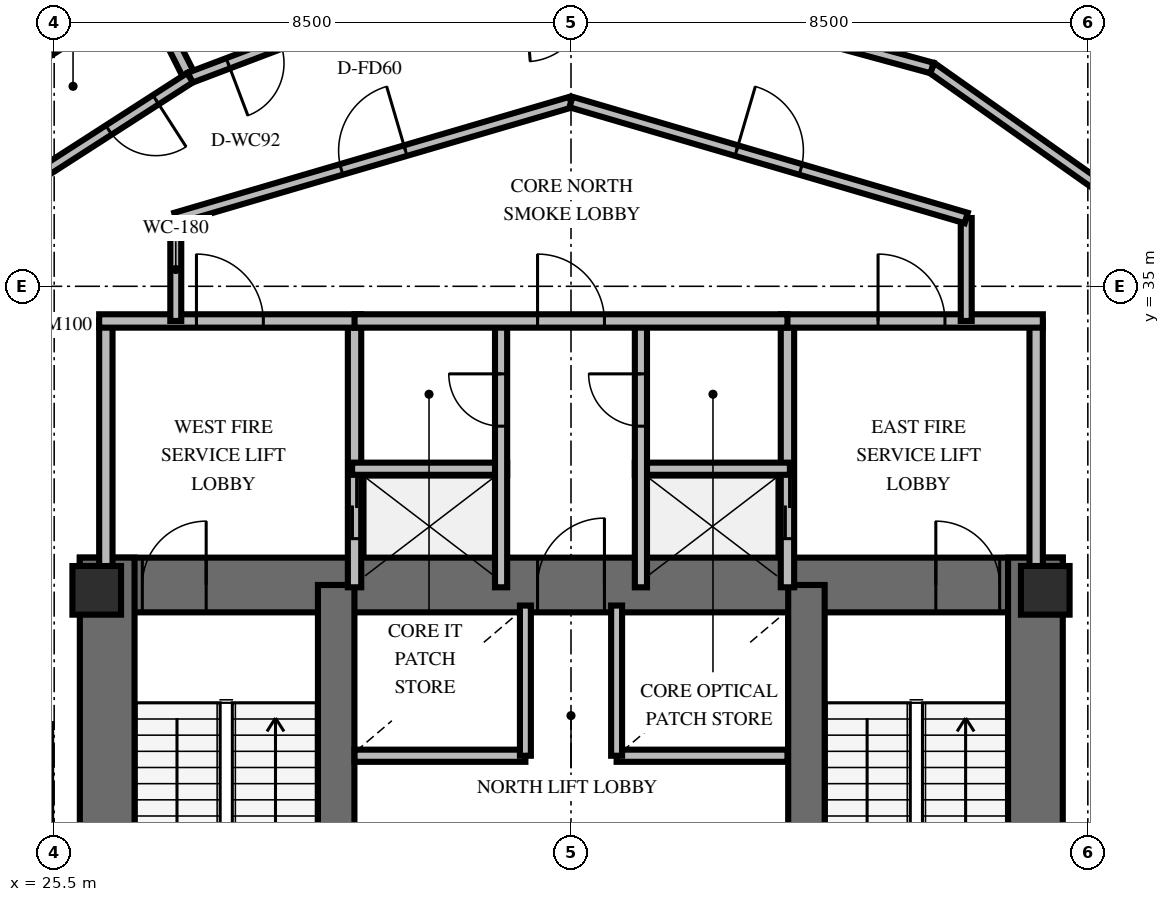
"""IFC4 building model, lengths in metres.
Left out: names, types, materials, properties, quantities, classifications, styles, units other than length and angle.
Written with IfcOpenShell. Run it as: python <this file> out.ifc"""

import sys

from ifc_helpers import new_model, si_unit, direction, frame, frame_2d, origin, origin_2d, place, context, subcontext, project, spatial, rectangle, extrude, element, fill, save


model = new_model("IFC4")
c1 = context("Model", 3, precision=1e-05, world=origin(), true_north=direction((0.0, 1.0)))
c2 = subcontext(c1, "Body", "Model", "MODEL_VIEW")
j1 = project(units=[si_unit("LENGTHUNIT", "METRE"), si_unit("PLANEANGLEUNIT", "RADIAN")], contexts=[c1])
p1 = place(None, origin())
s1 = spatial("IfcSite", under=j1, at=p1, CompositionType="ELEMENT")
p2 = place(p1, origin())
s2 = spatial("IfcBuilding", under=s1, at=p2, CompositionType="ELEMENT")
p3 = place(p2, frame((0.0, 0.0, 51.0)))
s3 = spatial("IfcBuildingStorey", under=s2, at=p3, CompositionType="ELEMENT", Elevation=51.0)
p4 = place(p3, frame((25.922, 30.088, 0.0), z_axis=(0.0, 0.0, 1.0), x_axis=(1.0, 0.0, 0.0)))
e1 = element("IfcWall", 1, at=p4, inside=s3, PredefinedType="SHEAR", context=c2, shape_type="SweptSolid", body=[
    extrude(rectangle(XDim=16.166, YDim=0.9, at=frame_2d((8.083, 0.0))), origin(), (0.0, 0.0, 1.0), 4.2),
])
p5 = place(p4, frame((1.028, 0.0, 0.0)))
e2 = element("IfcOpeningElement", 2, at=p5, cuts=e1, PredefinedType="OPENING", context=c2, shape_type="SweptSolid", body=[
    extrude(rectangle(XDim=1.05, YDim=2.15, at=frame_2d((0.525, 1.075))), frame((0.0, 0.46, 0.0), z_axis=(0.0, -1.0, 0.0), x_axis=(1.0, 0.0, 0.0)), (0.0, 0.0, 1.0), 0.92),
])
p6 = place(p4, frame((14.078, 0.0, 0.0)))
e3 = element("IfcOpeningElement", 3, at=p6, cuts=e1, PredefinedType="OPENING", context=c2, shape_type="SweptSolid", body=[
    extrude(rectangle(XDim=1.05, YDim=2.15, at=frame_2d((0.525, 1.075))), frame((0.0, 0.46, 0.0), z_axis=(0.0, -1.0, 0.0), x_axis=(1.0, 0.0, 0.0)), (0.0, 0.0, 1.0), 0.92),
])
p7 = place(p4, frame((7.528, 0.0, 0.0)))
e4 = element("IfcOpeningElement", 4, at=p7, cuts=e1, PredefinedType="OPENING", context=c2, shape_type="SweptSolid", body=[
    extrude(rectangle(XDim=1.1, YDim=2.15, at=frame_2d((0.55, 1.075))), frame((0.0, 0.46, 0.0), z_axis=(0.0, -1.0, 0.0), x_axis=(1.0, 0.0, 0.0)), (0.0, 0.0, 1.0), 0.92),
])
for number, where, z_axis, x_axis in (
    (5, (26.372, 19.662, 0.0), (0.0, 0.0, 1.0), (0.0, 1.0, 0.0)),
    (6, (41.638, 19.662, 0.0), (0.0, 0.0, 1.0), (0.0, 1.0, 0.0)),
):
    element("IfcWall", number, at=place(p3, frame(where, z_axis=z_axis, x_axis=x_axis)), inside=s3, PredefinedType="SHEAR", context=c2, shape_type="SweptSolid", body=[
        extrude(rectangle(XDim=10.876, YDim=0.9, at=frame_2d((5.438, 0.0))), origin(), (0.0, 0.0, 1.0), 4.2),
    ])
for number, where, z_axis, x_axis in (
    (7, (30.138, 20.112, 0.0), (0.0, 0.0, 1.0), (0.0, 1.0, 0.0)),
    (8, (37.872, 20.112, 0.0), (0.0, 0.0, 1.0), (0.0, 1.0, 0.0)),
):
    element("IfcWall", number, at=place(p3, frame(where, z_axis=z_axis, x_axis=x_axis)), inside=s3, PredefinedType="SHEAR", context=c2, shape_type="SweptSolid", body=[
        extrude(rectangle(XDim=9.976, YDim=0.6, at=frame_2d((4.988, 0.0))), origin(), (0.0, 0.0, 1.0), 4.2),
    ])
for number, where, z_axis, x_axis in (
    (9, (26.2, 30.0, 0.0), (0.0, 0.0, 1.0), (1.0, 0.0, 0.0)),
    (10, (41.8, 30.0, 0.0), (0.0, 0.0, 1.0), (1.0, 0.0, 0.0)),
):
    element("IfcColumn", number, at=place(p3, frame(where, z_axis=z_axis, x_axis=x_axis)), inside=s3, PredefinedType="PILASTER", context=c2, shape_type="SweptSolid", body=[
        extrude(rectangle(XDim=0.8, YDim=0.8, at=origin_2d()), origin(), (0.0, 0.0, 1.0), 4.2),
    ])
p8 = place(p3, frame((26.35, 30.05, 0.0), z_axis=(0.0, 0.0, 1.0), x_axis=(0.0, 1.0, 0.0)))
e11 = element("IfcWall", 11, at=p8, inside=s3, PredefinedType="SOLIDWALL", context=c2, shape_type="SweptSolid", body=[
    extrude(rectangle(XDim=4.38, YDim=0.22, at=frame_2d((2.19, 0.0))), origin(), (0.0, 0.0, 1.0), 3.0),
])
p9 = place(p3, frame((30.44, 30.05, 0.0), z_axis=(0.0, 0.0, 1.0), x_axis=(0.0, 1.0, 0.0)))
e12 = element("IfcWall", 12, at=p9, inside=s3, PredefinedType="SOLIDWALL", context=c2, shape_type="SweptSolid", body=[
    extrude(rectangle(XDim=4.38, YDim=0.22, at=frame_2d((2.19, 0.0))), origin(), (0.0, 0.0, 1.0), 3.0),
])
p10 = place(p9, frame((0.8, 0.0, 0.0)))
e13 = element("IfcOpeningElement", 13, at=p10, cuts=e12, PredefinedType="OPENING", context=c2, shape_type="SweptSolid", body=[
    extrude(rectangle(XDim=1.05, YDim=2.1, at=frame_2d((0.525, 1.05))), frame((0.0, 0.12, 0.0), z_axis=(0.0, -1.0, 0.0), x_axis=(1.0, 0.0, 0.0)), (0.0, 0.0, 1.0), 0.24),
])
p11 = place(p3, frame((26.24, 34.43, 0.0), z_axis=(0.0, 0.0, 1.0), x_axis=(1.0, 0.0, 0.0)))
e14 = element("IfcWall", 14, at=p11, inside=s3, PredefinedType="SOLIDWALL", context=c2, shape_type="SweptSolid", body=[
    extrude(rectangle(XDim=4.31, YDim=0.22, at=frame_2d((2.155, 0.0))), origin(), (0.0, 0.0, 1.0), 3.0),
])
p12 = place(p11, frame((1.6, 0.0, 0.0)))
e15 = element("IfcOpeningElement", 15, at=p12, cuts=e14, PredefinedType="OPENING", context=c2, shape_type="SweptSolid", body=[
    extrude(rectangle(XDim=1.1, YDim=2.15, at=frame_2d((0.55, 1.075))), frame((0.0, 0.12, 0.0), z_axis=(0.0, -1.0, 0.0), x_axis=(1.0, 0.0, 0.0)), (0.0, 0.0, 1.0), 0.24),
])
p13 = place(p3, frame((30.4, 32.0, 0.0), z_axis=(0.0, 0.0, 1.0), x_axis=(1.0, 0.0, 0.0)))
e16 = element("IfcWall", 16, at=p13, inside=s3, PredefinedType="SOLIDWALL", context=c2, shape_type="SweptSolid", body=[
    extrude(rectangle(XDim=2.55, YDim=0.2, at=frame_2d((1.275, 0.0))), origin(), (0.0, 0.0, 1.0), 3.0),
])
p14 = place(p3, frame((32.85, 30.05, 0.0), z_axis=(0.0, 0.0, 1.0), x_axis=(0.0, 1.0, 0.0)))
e17 = element("IfcWall", 17, at=p14, inside=s3, PredefinedType="SOLIDWALL", context=c2, shape_type="SweptSolid", body=[
    extrude(rectangle(XDim=4.38, YDim=0.2, at=frame_2d((2.19, 0.0))), origin(), (0.0, 0.0, 1.0), 3.0),
])
p15 = place(p14, frame((2.65, 0.0, 0.0)))
e18 = element("IfcOpeningElement", 18, at=p15, cuts=e17, PredefinedType="OPENING", context=c2, shape_type="SweptSolid", body=[
    extrude(rectangle(XDim=0.86, YDim=2.05, at=frame_2d((0.43, 1.025))), frame((0.0, 0.11, 0.0), z_axis=(0.0, -1.0, 0.0), x_axis=(1.0, 0.0, 0.0)), (0.0, 0.0, 1.0), 0.22),
])
p16 = place(p3, frame((37.56, 30.05, 0.0), z_axis=(0.0, 0.0, 1.0), x_axis=(0.0, 1.0, 0.0)))
e19 = element("IfcWall", 19, at=p16, inside=s3, PredefinedType="SOLIDWALL", context=c2, shape_type="SweptSolid", body=[
    extrude(rectangle(XDim=4.38, YDim=0.22, at=frame_2d((2.19, 0.0))), origin(), (0.0, 0.0, 1.0), 3.0),
])
p17 = place(p16, frame((0.8, 0.0, 0.0)))
e20 = element("IfcOpeningElement", 20, at=p17, cuts=e19, PredefinedType="OPENING", context=c2, shape_type="SweptSolid", body=[
    extrude(rectangle(XDim=1.05, YDim=2.1, at=frame_2d((0.525, 1.05))), frame((0.0, 0.12, 0.0), z_axis=(0.0, -1.0, 0.0), x_axis=(1.0, 0.0, 0.0)), (0.0, 0.0, 1.0), 0.24),
])
p18 = place(p3, frame((41.65, 30.05, 0.0), z_axis=(0.0, 0.0, 1.0), x_axis=(0.0, 1.0, 0.0)))
e21 = element("IfcWall", 21, at=p18, inside=s3, PredefinedType="SOLIDWALL", context=c2, shape_type="SweptSolid", body=[
    extrude(rectangle(XDim=4.38, YDim=0.22, at=frame_2d((2.19, 0.0))), origin(), (0.0, 0.0, 1.0), 3.0),
])
p19 = place(p3, frame((37.45, 34.43, 0.0), z_axis=(0.0, 0.0, 1.0), x_axis=(1.0, 0.0, 0.0)))
e22 = element("IfcWall", 22, at=p19, inside=s3, PredefinedType="SOLIDWALL", context=c2, shape_type="SweptSolid", body=[
    extrude(rectangle(XDim=4.31, YDim=0.22, at=frame_2d((2.155, 0.0))), origin(), (0.0, 0.0, 1.0), 3.0),
])
p20 = place(p19, frame((1.6, 0.0, 0.0)))
e23 = element("IfcOpeningElement", 23, at=p20, cuts=e22, PredefinedType="OPENING", context=c2, shape_type="SweptSolid", body=[
    extrude(rectangle(XDim=1.1, YDim=2.15, at=frame_2d((0.55, 1.075))), frame((0.0, 0.12, 0.0), z_axis=(0.0, -1.0, 0.0), x_axis=(1.0, 0.0, 0.0)), (0.0, 0.0, 1.0), 0.24),
])
p21 = place(p3, frame((35.05, 32.0, 0.0), z_axis=(0.0, 0.0, 1.0), x_axis=(1.0, 0.0, 0.0)))
e24 = element("IfcWall", 24, at=p21, inside=s3, PredefinedType="SOLIDWALL", context=c2, shape_type="SweptSolid", body=[
    extrude(rectangle(XDim=2.55, YDim=0.2, at=frame_2d((1.275, 0.0))), origin(), (0.0, 0.0, 1.0), 3.0),
])
p22 = place(p3, frame((35.15, 30.05, 0.0), z_axis=(0.0, 0.0, 1.0), x_axis=(0.0, 1.0, 0.0)))
e25 = element("IfcWall", 25, at=p22, inside=s3, PredefinedType="SOLIDWALL", context=c2, shape_type="SweptSolid", body=[
    extrude(rectangle(XDim=4.38, YDim=0.2, at=frame_2d((2.19, 0.0))), origin(), (0.0, 0.0, 1.0), 3.0),
])
p23 = place(p22, frame((2.65, 0.0, 0.0)))
e26 = element("IfcOpeningElement", 26, at=p23, cuts=e25, PredefinedType="OPENING", context=c2, shape_type="SweptSolid", body=[
    extrude(rectangle(XDim=0.86, YDim=2.05, at=frame_2d((0.43, 1.025))), frame((0.0, 0.11, 0.0), z_axis=(0.0, -1.0, 0.0), x_axis=(1.0, 0.0, 0.0)), (0.0, 0.0, 1.0), 0.22),
])
p24 = place(p3, frame((30.44, 34.43, 0.0), z_axis=(0.0, 0.0, 1.0), x_axis=(1.0, 0.0, 0.0)))
e27 = element("IfcWall", 27, at=p24, inside=s3, PredefinedType="SOLIDWALL", context=c2, shape_type="SweptSolid", body=[
    extrude(rectangle(XDim=7.12, YDim=0.22, at=frame_2d((3.56, 0.0))), origin(), (0.0, 0.0, 1.0), 3.0),
])
p25 = place(p24, frame((3.01, 0.0, 0.0)))
e28 = element("IfcOpeningElement", 28, at=p25, cuts=e27, PredefinedType="OPENING", context=c2, shape_type="SweptSolid", body=[
    extrude(rectangle(XDim=1.1, YDim=2.15, at=frame_2d((0.55, 1.075))), frame((0.0, 0.12, 0.0), z_axis=(0.0, -1.0, 0.0), x_axis=(1.0, 0.0, 0.0)), (0.0, 0.0, 1.0), 0.24),
])
p26 = place(p3, frame((30.44, 27.28, 0.0), z_axis=(0.0, 0.0, 1.0), x_axis=(1.0, 0.0, 0.0)))
e29 = element("IfcWall", 29, at=p26, inside=s3, PredefinedType="SOLIDWALL", context=c2, shape_type="SweptSolid", body=[
    extrude(rectangle(XDim=2.81, YDim=0.2, at=frame_2d((1.405, 0.0))), origin(), (0.0, 0.0, 1.0), 3.0),
])
p27 = place(p3, frame((33.25, 27.28, 0.0), z_axis=(0.0, 0.0, 1.0), x_axis=(0.0, 1.0, 0.0)))
e30 = element("IfcWall", 30, at=p27, inside=s3, PredefinedType="SOLIDWALL", context=c2, shape_type="SweptSolid", body=[
    extrude(rectangle(XDim=2.47, YDim=0.18, at=frame_2d((1.235, 0.0))), origin(), (0.0, 0.0, 1.0), 3.0),
])
p28 = place(p3, frame((34.75, 27.28, 0.0), z_axis=(0.0, 0.0, 1.0), x_axis=(1.0, 0.0, 0.0)))
e31 = element("IfcWall", 31, at=p28, inside=s3, PredefinedType="SOLIDWALL", context=c2, shape_type="SweptSolid", body=[
    extrude(rectangle(XDim=2.81, YDim=0.2, at=frame_2d((1.405, 0.0))), origin(), (0.0, 0.0, 1.0), 3.0),
])
p29 = place(p3, frame((34.75, 27.28, 0.0), z_axis=(0.0, 0.0, 1.0), x_axis=(0.0, 1.0, 0.0)))
e32 = element("IfcWall", 32, at=p29, inside=s3, PredefinedType="SOLIDWALL", context=c2, shape_type="SweptSolid", body=[
    extrude(rectangle(XDim=2.47, YDim=0.18, at=frame_2d((1.235, 0.0))), origin(), (0.0, 0.0, 1.0), 3.0),
])
for number, where, z_axis, x_axis in (
    (33, (27.5, 34.43, 0.0), (0.0, 0.0, 1.0), (0.0, 1.0, 0.0)),
    (34, (40.5, 36.123, 0.0), (0.0, 0.0, 1.0), (0.0, -1.0, 0.0)),
):
    element("IfcWall", number, at=place(p3, frame(where, z_axis=z_axis, x_axis=x_axis)), inside=s3, PredefinedType="PARTITIONING", context=c2, shape_type="SweptSolid", body=[
        extrude(rectangle(XDim=1.693, YDim=0.18, at=frame_2d((0.846, 0.0))), origin(), (0.0, 0.0, 1.0), 3.0),
    ])
p30 = place(p3, frame((27.5, 36.123, 0.0), z_axis=(0.0, 0.0, 1.0), x_axis=(0.959546654541, 0.281549671923, 0.0)))
e35 = element("IfcWall", 35, at=p30, inside=s3, PredefinedType="PARTITIONING", context=c2, shape_type="SweptSolid", body=[
    extrude(rectangle(XDim=6.774, YDim=0.18, at=frame_2d((3.387, 0.0))), origin(), (0.0, 0.0, 1.0), 3.0),
])
p31 = place(p30, frame((2.837, 0.0, 0.0)))
e36 = element("IfcOpeningElement", 36, at=p31, cuts=e35, PredefinedType="OPENING", context=c2, shape_type="SweptSolid", body=[
    extrude(rectangle(XDim=1.1, YDim=2.15, at=frame_2d((0.55, 1.075))), frame((0.0, 0.1, 0.0), z_axis=(0.0, -1.0, 0.0), x_axis=(1.0, 0.0, 0.0)), (0.0, 0.0, 1.0), 0.2),
])
p32 = place(p3, frame((34.0, 38.03, 0.0), z_axis=(0.0, 0.0, 1.0), x_axis=(0.959546654541, -0.281549671923, 0.0)))
e37 = element("IfcWall", 37, at=p32, inside=s3, PredefinedType="PARTITIONING", context=c2, shape_type="SweptSolid", body=[
    extrude(rectangle(XDim=6.774, YDim=0.18, at=frame_2d((3.387, 0.0))), origin(), (0.0, 0.0, 1.0), 3.0),
])
p33 = place(p32, frame((2.837, 0.0, 0.0)))
e38 = element("IfcOpeningElement", 38, at=p33, cuts=e37, PredefinedType="OPENING", context=c2, shape_type="SweptSolid", body=[
    extrude(rectangle(XDim=1.1, YDim=2.15, at=frame_2d((0.55, 1.075))), frame((0.0, 0.1, 0.0), z_axis=(0.0, -1.0, 0.0), x_axis=(1.0, 0.0, 0.0)), (0.0, 0.0, 1.0), 0.2),
])
p34 = place(p3, frame((27.735, 38.43, 0.0), z_axis=(0.0, 0.0, 1.0), x_axis=(-0.450111370482, 0.892972426317, 0.0)))
e39 = element("IfcWall", 39, at=p34, inside=s3, PredefinedType="PLUMBINGWALL", context=c2, shape_type="SweptSolid", body=[
    extrude(rectangle(XDim=1.65, YDim=0.2, at=frame_2d((0.825, 0.0))), origin(), (0.0, 0.0, 1.0), 3.0),
])
p35 = place(p3, frame((30.456, 39.461, 0.0), z_axis=(0.0, 0.0, 1.0), x_axis=(-0.935158603079, -0.35422928604, 0.0)))
e40 = element("IfcWall", 40, at=p35, inside=s3, PredefinedType="PARTITIONING", context=c2, shape_type="SweptSolid", body=[
    extrude(rectangle(XDim=2.91, YDim=0.18, at=frame_2d((1.455, 0.0))), origin(), (0.0, 0.0, 1.0), 3.0),
])
p36 = place(p35, frame((1.321, 0.0, 0.0)))
e41 = element("IfcOpeningElement", 41, at=p36, cuts=e40, PredefinedType="OPENING", context=c2, shape_type="SweptSolid", body=[
    extrude(rectangle(XDim=0.92, YDim=2.1, at=frame_2d((0.46, 1.05))), frame((0.0, 0.1, 0.0), z_axis=(0.0, -1.0, 0.0), x_axis=(1.0, 0.0, 0.0)), (0.0, 0.0, 1.0), 0.2),
])
p37 = place(p3, frame((26.992, 39.904, 0.0), z_axis=(0.0, 0.0, 1.0), x_axis=(-0.841020037303, -0.5410039712, 0.0)))
e42 = element("IfcWall", 42, at=p37, inside=s3, PredefinedType="PLUMBINGWALL", context=c2, shape_type="SweptSolid", body=[
    extrude(rectangle(XDim=3.255, YDim=0.2, at=frame_2d((1.627, 0.0))), origin(), (0.0, 0.0, 1.0), 3.0),
])
p38 = place(p3, frame((27.735, 38.43, 0.0), z_axis=(0.0, 0.0, 1.0), x_axis=(-0.841012166925, -0.541016205935, 0.0)))
e43 = element("IfcWall", 43, at=p38, inside=s3, PredefinedType="PARTITIONING", context=c2, shape_type="SweptSolid", body=[
    extrude(rectangle(XDim=2.91, YDim=0.18, at=frame_2d((1.455, 0.0))), origin(), (0.0, 0.0, 1.0), 3.0),
])
p39 = place(p38, frame((0.669, 0.0, 0.0)))
e44 = element("IfcOpeningElement", 44, at=p39, cuts=e43, PredefinedType="OPENING", context=c2, shape_type="SweptSolid", body=[
    extrude(rectangle(XDim=0.92, YDim=2.1, at=frame_2d((0.46, 1.05))), frame((0.0, 0.1, 0.0), z_axis=(0.0, -1.0, 0.0), x_axis=(1.0, 0.0, 0.0)), (0.0, 0.0, 1.0), 0.2),
])
p40 = place(p3, frame((43.886, 35.8, 0.0), z_axis=(0.0, 0.0, 1.0), x_axis=(-0.816630436939, 0.577160921636, 0.0)))
e45 = element("IfcWall", 45, at=p40, inside=s3, PredefinedType="PARTITIONING", context=c2, shape_type="SweptSolid", body=[
    extrude(rectangle(XDim=4.834, YDim=0.18, at=frame_2d((2.417, 0.0))), origin(), (0.0, 0.0, 1.0), 3.0),
])
p41 = place(p3, frame((39.938, 38.59, 0.0), z_axis=(0.0, 0.0, 1.0), x_axis=(-0.964791786171, 0.26301484623, 0.0)))
e46 = element("IfcWall", 46, at=p41, inside=s3, PredefinedType="PARTITIONING", context=c2, shape_type="SweptSolid", body=[
    extrude(rectangle(XDim=4.834, YDim=0.18, at=frame_2d((2.417, 0.0))), origin(), (0.0, 0.0, 1.0), 3.0),
])
p42 = place(p5, origin())
e47 = element("IfcDoor", 47, at=p42, inside=s3, OperationType="SINGLE_SWING_RIGHT", PredefinedType="DOOR", context=c2, shape_type="SweptSolid", body=[
    extrude(rectangle(XDim=1.05, YDim=2.15, at=frame_2d((0.525, 1.075))), frame((0.0, 0.025, 0.0), z_axis=(0.0, -1.0, 0.0), x_axis=(1.0, 0.0, 0.0)), (0.0, 0.0, 1.0), 0.05),
])
fill(e2, e47)
p43 = place(p6, origin())
e48 = element("IfcDoor", 48, at=p43, inside=s3, OperationType="SINGLE_SWING_LEFT", PredefinedType="DOOR", context=c2, shape_type="SweptSolid", body=[
    extrude(rectangle(XDim=1.05, YDim=2.15, at=frame_2d((0.525, 1.075))), frame((0.0, 0.025, 0.0), z_axis=(0.0, -1.0, 0.0), x_axis=(1.0, 0.0, 0.0)), (0.0, 0.0, 1.0), 0.05),
])
fill(e3, e48)
p44 = place(p7, origin())
e49 = element("IfcDoor", 49, at=p44, inside=s3, OperationType="SINGLE_SWING_RIGHT", PredefinedType="DOOR", context=c2, shape_type="SweptSolid", body=[
    extrude(rectangle(XDim=1.1, YDim=2.15, at=frame_2d((0.55, 1.075))), frame((0.0, 0.025, 0.0), z_axis=(0.0, -1.0, 0.0), x_axis=(1.0, 0.0, 0.0)), (0.0, 0.0, 1.0), 0.05),
])
fill(e4, e49)
p45 = place(p12, origin())
e50 = element("IfcDoor", 50, at=p45, inside=s3, OperationType="SINGLE_SWING_LEFT", PredefinedType="DOOR", context=c2, shape_type="SweptSolid", body=[
    extrude(rectangle(XDim=1.1, YDim=2.15, at=frame_2d((0.55, 1.075))), frame((0.0, 0.025, 0.0), z_axis=(0.0, -1.0, 0.0), x_axis=(1.0, 0.0, 0.0)), (0.0, 0.0, 1.0), 0.05),
])
fill(e15, e50)
p46 = place(p10, origin())
e51 = element("IfcDoor", 51, at=p46, inside=s3, OperationType="DOUBLE_DOOR_SLIDING", PredefinedType="USERDEFINED", context=c2, shape_type="SweptSolid", body=[
    extrude(rectangle(XDim=1.05, YDim=2.1, at=frame_2d((0.525, 1.05))), frame((0.0, 0.025, 0.0), z_axis=(0.0, -1.0, 0.0), x_axis=(1.0, 0.0, 0.0)), (0.0, 0.0, 1.0), 0.05),
])
fill(e13, e51)
p47 = place(p15, origin())
e52 = element("IfcDoor", 52, at=p47, inside=s3, OperationType="SINGLE_SWING_RIGHT", PredefinedType="TRAPDOOR", context=c2, shape_type="SweptSolid", body=[
    extrude(rectangle(XDim=0.86, YDim=2.05, at=frame_2d((0.43, 1.025))), frame((0.0, 0.025, 0.0), z_axis=(0.0, -1.0, 0.0), x_axis=(1.0, 0.0, 0.0)), (0.0, 0.0, 1.0), 0.05),
])
fill(e18, e52)
p48 = place(p20, origin())
e53 = element("IfcDoor", 53, at=p48, inside=s3, OperationType="SINGLE_SWING_LEFT", PredefinedType="DOOR", context=c2, shape_type="SweptSolid", body=[
    extrude(rectangle(XDim=1.1, YDim=2.15, at=frame_2d((0.55, 1.075))), frame((0.0, 0.025, 0.0), z_axis=(0.0, -1.0, 0.0), x_axis=(1.0, 0.0, 0.0)), (0.0, 0.0, 1.0), 0.05),
])
fill(e23, e53)
p49 = place(p17, origin())
e54 = element("IfcDoor", 54, at=p49, inside=s3, OperationType="DOUBLE_DOOR_SLIDING", PredefinedType="USERDEFINED", context=c2, shape_type="SweptSolid", body=[
    extrude(rectangle(XDim=1.05, YDim=2.1, at=frame_2d((0.525, 1.05))), frame((0.0, 0.025, 0.0), z_axis=(0.0, -1.0, 0.0), x_axis=(1.0, 0.0, 0.0)), (0.0, 0.0, 1.0), 0.05),
])
fill(e20, e54)
p50 = place(p23, origin())
e55 = element("IfcDoor", 55, at=p50, inside=s3, OperationType="SINGLE_SWING_RIGHT", PredefinedType="TRAPDOOR", context=c2, shape_type="SweptSolid", body=[
    extrude(rectangle(XDim=0.86, YDim=2.05, at=frame_2d((0.43, 1.025))), frame((0.0, 0.025, 0.0), z_axis=(0.0, -1.0, 0.0), x_axis=(1.0, 0.0, 0.0)), (0.0, 0.0, 1.0), 0.05),
])
fill(e26, e55)
p51 = place(p25, origin())
e56 = element("IfcDoor", 56, at=p51, inside=s3, OperationType="SINGLE_SWING_LEFT", PredefinedType="DOOR", context=c2, shape_type="SweptSolid", body=[
    extrude(rectangle(XDim=1.1, YDim=2.15, at=frame_2d((0.55, 1.075))), frame((0.0, 0.025, 0.0), z_axis=(0.0, -1.0, 0.0), x_axis=(1.0, 0.0, 0.0)), (0.0, 0.0, 1.0), 0.05),
])
fill(e28, e56)
p52 = place(p31, origin())
e57 = element("IfcDoor", 57, at=p52, inside=s3, OperationType="SINGLE_SWING_RIGHT", PredefinedType="DOOR", context=c2, shape_type="SweptSolid", body=[
    extrude(rectangle(XDim=1.1, YDim=2.15, at=frame_2d((0.55, 1.075))), frame((0.0, 0.025, 0.0), z_axis=(0.0, -1.0, 0.0), x_axis=(1.0, 0.0, 0.0)), (0.0, 0.0, 1.0), 0.05),
])
fill(e36, e57)
p53 = place(p33, origin())
e58 = element("IfcDoor", 58, at=p53, inside=s3, OperationType="SINGLE_SWING_LEFT", PredefinedType="DOOR", context=c2, shape_type="SweptSolid", body=[
    extrude(rectangle(XDim=1.1, YDim=2.15, at=frame_2d((0.55, 1.075))), frame((0.0, 0.025, 0.0), z_axis=(0.0, -1.0, 0.0), x_axis=(1.0, 0.0, 0.0)), (0.0, 0.0, 1.0), 0.05),
])
fill(e38, e58)
p54 = place(p36, origin())
e59 = element("IfcDoor", 59, at=p54, inside=s3, OperationType="SINGLE_SWING_RIGHT", PredefinedType="DOOR", context=c2, shape_type="SweptSolid", body=[
    extrude(rectangle(XDim=0.92, YDim=2.1, at=frame_2d((0.46, 1.05))), frame((0.0, 0.025, 0.0), z_axis=(0.0, -1.0, 0.0), x_axis=(1.0, 0.0, 0.0)), (0.0, 0.0, 1.0), 0.05),
])
fill(e41, e59)
p55 = place(p39, origin())
e60 = element("IfcDoor", 60, at=p55, inside=s3, OperationType="SINGLE_SWING_LEFT", PredefinedType="DOOR", context=c2, shape_type="SweptSolid", body=[
    extrude(rectangle(XDim=0.92, YDim=2.1, at=frame_2d((0.46, 1.05))), frame((0.0, 0.025, 0.0), z_axis=(0.0, -1.0, 0.0), x_axis=(1.0, 0.0, 0.0)), (0.0, 0.0, 1.0), 0.05),
])
fill(e44, e60)
save(model, sys.argv[1])
